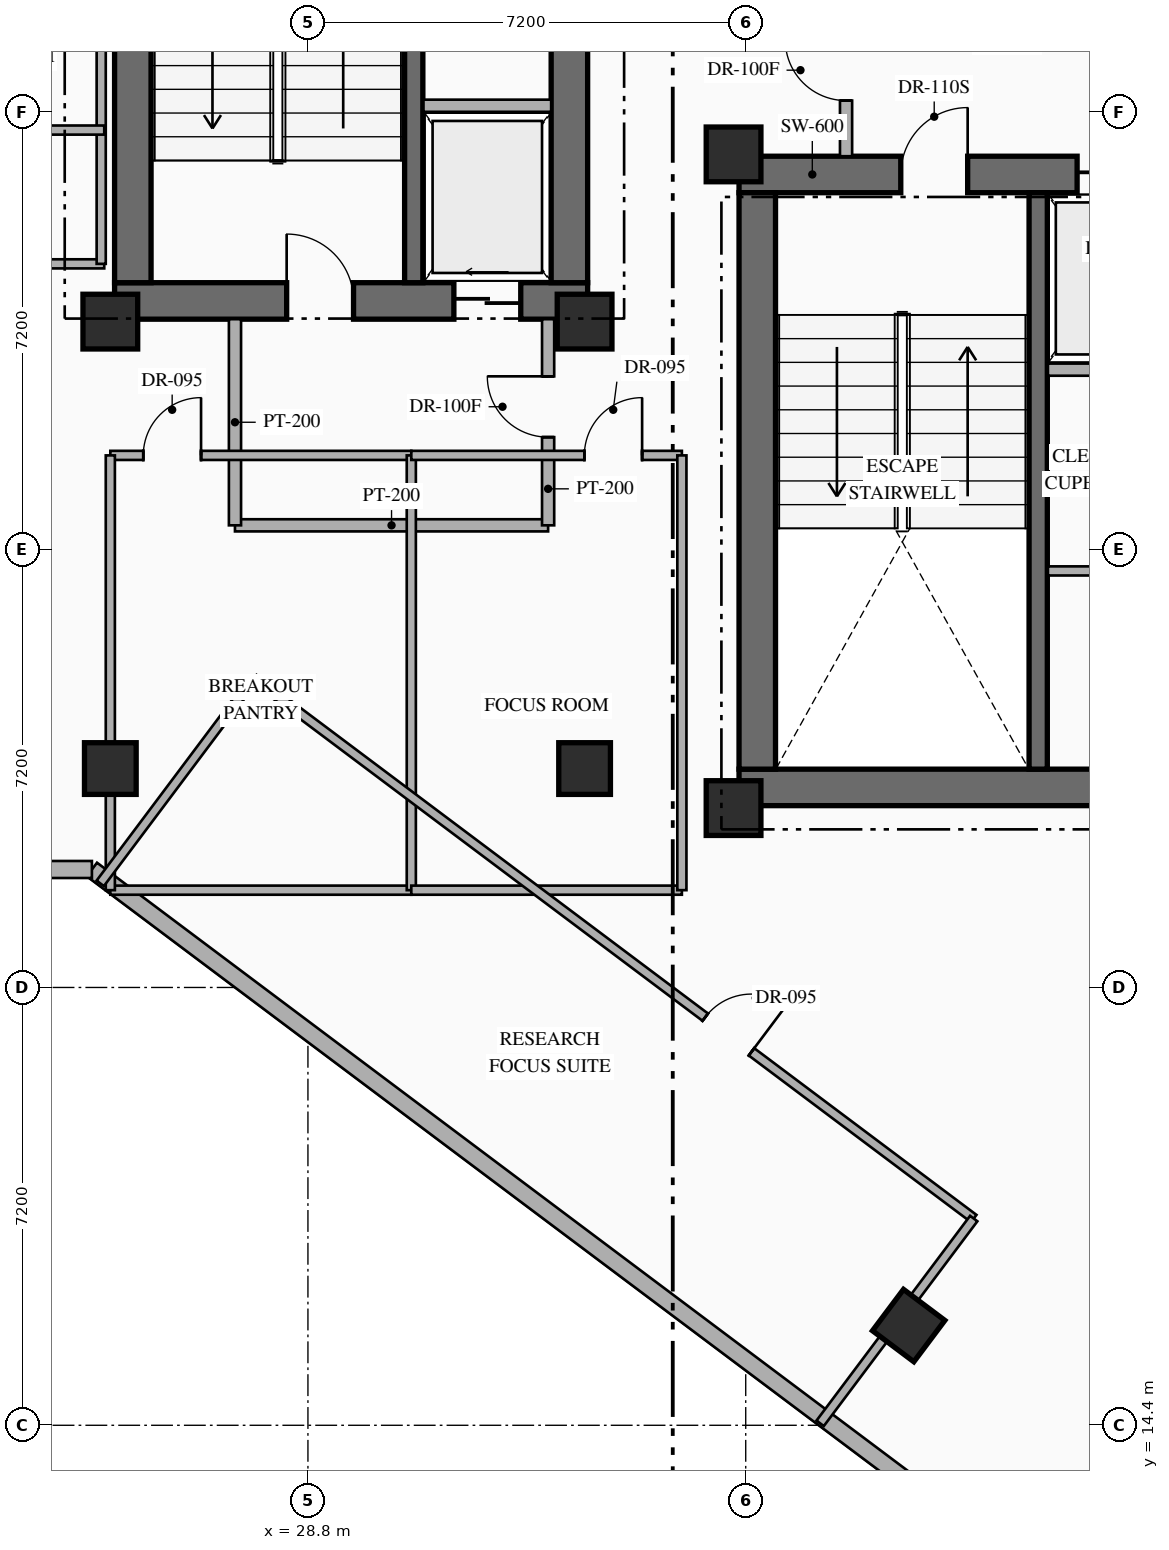
"""IFC4 building model, lengths in metres.
Left out: names, types, materials, properties, quantities, classifications, styles, units other than length and angle.
Written with IfcOpenShell. Run it as: python <this file> out.ifc"""

import sys

from ifc_helpers import new_model, si_unit, direction, frame, frame_2d, origin, origin_2d, place, context, subcontext, project, spatial, rectangle, hollow_rectangle, extrude, element, fill, save


model = new_model("IFC4")
c1 = context("Model", 3, precision=1e-05, world=origin(), true_north=direction((0.0, 1.0)))
c2 = subcontext(c1, "Body", "Model", "MODEL_VIEW")
j1 = project(units=[si_unit("LENGTHUNIT", "METRE"), si_unit("PLANEANGLEUNIT", "RADIAN")], contexts=[c1])
p1 = place(None, origin())
s1 = spatial("IfcSite", under=j1, at=p1, CompositionType="ELEMENT")
p2 = place(p1, origin())
s2 = spatial("IfcBuilding", under=s1, at=p2, CompositionType="ELEMENT")
p3 = place(p2, frame((0.0, 0.0, 156.45)))
s3 = spatial("IfcBuildingStorey", under=s2, at=p3, CompositionType="ELEMENT", Elevation=156.45)
p4 = place(p3, frame((25.62, 32.89, 0.0), z_axis=(0.0, 0.0, 1.0), x_axis=(1.0, 0.0, 0.0)))
e1 = element("IfcWall", 1, at=p4, inside=s3, PredefinedType="SHEAR", context=c2, shape_type="SweptSolid", body=[
    extrude(rectangle(XDim=7.78, YDim=0.6, at=frame_2d((3.89, 0.0))), origin(), (0.0, 0.0, 1.0), 3.6),
])
p5 = place(p4, frame((2.83, 0.0, 0.0)))
e2 = element("IfcOpeningElement", 2, at=p5, cuts=e1, PredefinedType="OPENING", context=c2, shape_type="SweptSolid", body=[
    extrude(rectangle(XDim=1.1, YDim=2.2, at=frame_2d((0.55, 1.1))), frame((0.0, 0.31, 0.0), z_axis=(0.0, -1.0, 0.0), x_axis=(1.0, 0.0, 0.0)), (0.0, 0.0, 1.0), 0.62),
])
p6 = place(p4, frame((5.58, 0.0, 0.0)))
e3 = element("IfcOpeningElement", 3, at=p6, cuts=e1, PredefinedType="OPENING", context=c2, shape_type="SweptSolid", body=[
    extrude(rectangle(XDim=1.1, YDim=2.15, at=frame_2d((0.55, 1.075))), frame((0.0, 0.31, 0.0), z_axis=(0.0, -1.0, 0.0), x_axis=(1.0, 0.0, 0.0)), (0.0, 0.0, 1.0), 0.62),
])
p7 = place(p3, frame((25.92, 33.19, 0.0), z_axis=(0.0, 0.0, 1.0), x_axis=(0.0, 1.0, 0.0)))
e4 = element("IfcWall", 4, at=p7, inside=s3, PredefinedType="SHEAR", context=c2, shape_type="SweptSolid", body=[
    extrude(rectangle(XDim=9.48, YDim=0.6, at=frame_2d((4.74, 0.0))), origin(), (0.0, 0.0, 1.0), 3.6),
])
p8 = place(p3, frame((33.1, 33.19, 0.0), z_axis=(0.0, 0.0, 1.0), x_axis=(0.0, 1.0, 0.0)))
e5 = element("IfcWall", 5, at=p8, inside=s3, PredefinedType="SHEAR", context=c2, shape_type="SweptSolid", body=[
    extrude(rectangle(XDim=9.48, YDim=0.6, at=frame_2d((4.74, 0.0))), origin(), (0.0, 0.0, 1.0), 3.6),
])
p9 = place(p8, frame((4.16, 0.0, 0.0)))
e6 = element("IfcOpeningElement", 6, at=p9, cuts=e5, PredefinedType="OPENING", context=c2, shape_type="SweptSolid", body=[
    extrude(rectangle(XDim=0.85, YDim=2.08, at=frame_2d((0.425, 1.04))), frame((0.0, 0.31, 0.0), z_axis=(0.0, -1.0, 0.0), x_axis=(1.0, 0.0, 0.0)), (0.0, 0.0, 1.0), 0.62),
])
p10 = place(p8, frame((7.36, 0.0, 0.0)))
e7 = element("IfcOpeningElement", 7, at=p10, cuts=e5, PredefinedType="OPENING", context=c2, shape_type="SweptSolid", body=[
    extrude(rectangle(XDim=0.85, YDim=2.08, at=frame_2d((0.425, 1.04))), frame((0.0, 0.31, 0.0), z_axis=(0.0, -1.0, 0.0), x_axis=(1.0, 0.0, 0.0)), (0.0, 0.0, 1.0), 0.62),
])
p11 = place(p3, frame((30.54, 33.19, 0.0), z_axis=(0.0, 0.0, 1.0), x_axis=(0.0, 1.0, 0.0)))
e8 = element("IfcWall", 8, at=p11, inside=s3, PredefinedType="SHEAR", context=c2, shape_type="SweptSolid", body=[
    extrude(rectangle(XDim=9.48, YDim=0.3, at=frame_2d((4.74, 0.0))), origin(), (0.0, 0.0, 1.0), 3.6),
])
p12 = place(p3, frame((35.89, 24.89, 0.0), z_axis=(0.0, 0.0, 1.0), x_axis=(1.0, 0.0, 0.0)))
e9 = element("IfcWall", 9, at=p12, inside=s3, PredefinedType="SHEAR", context=c2, shape_type="SweptSolid", body=[
    extrude(rectangle(XDim=7.76, YDim=0.6, at=frame_2d((3.88, 0.0))), origin(), (0.0, 0.0, 1.0), 3.6),
])
p13 = place(p3, frame((35.89, 34.97, 0.0), z_axis=(0.0, 0.0, 1.0), x_axis=(1.0, 0.0, 0.0)))
e10 = element("IfcWall", 10, at=p13, inside=s3, PredefinedType="SHEAR", context=c2, shape_type="SweptSolid", body=[
    extrude(rectangle(XDim=7.76, YDim=0.6, at=frame_2d((3.88, 0.0))), origin(), (0.0, 0.0, 1.0), 3.6),
])
p14 = place(p13, frame((2.66, 0.0, 0.0)))
e11 = element("IfcOpeningElement", 11, at=p14, cuts=e10, PredefinedType="OPENING", context=c2, shape_type="SweptSolid", body=[
    extrude(rectangle(XDim=1.1, YDim=2.2, at=frame_2d((0.55, 1.1))), frame((0.0, 0.31, 0.0), z_axis=(0.0, -1.0, 0.0), x_axis=(1.0, 0.0, 0.0)), (0.0, 0.0, 1.0), 0.62),
])
p15 = place(p13, frame((5.56, 0.0, 0.0)))
e12 = element("IfcOpeningElement", 12, at=p15, cuts=e10, PredefinedType="OPENING", context=c2, shape_type="SweptSolid", body=[
    extrude(rectangle(XDim=1.12, YDim=2.15, at=frame_2d((0.56, 1.075))), frame((0.0, 0.31, 0.0), z_axis=(0.0, -1.0, 0.0), x_axis=(1.0, 0.0, 0.0)), (0.0, 0.0, 1.0), 0.62),
])
p16 = place(p3, frame((36.19, 25.19, 0.0), z_axis=(0.0, 0.0, 1.0), x_axis=(0.0, 1.0, 0.0)))
e13 = element("IfcWall", 13, at=p16, inside=s3, PredefinedType="SHEAR", context=c2, shape_type="SweptSolid", body=[
    extrude(rectangle(XDim=9.48, YDim=0.6, at=frame_2d((4.74, 0.0))), origin(), (0.0, 0.0, 1.0), 3.6),
])
p17 = place(p3, frame((40.81, 25.19, 0.0), z_axis=(0.0, 0.0, 1.0), x_axis=(0.0, 1.0, 0.0)))
e14 = element("IfcWall", 14, at=p17, inside=s3, PredefinedType="SHEAR", context=c2, shape_type="SweptSolid", body=[
    extrude(rectangle(XDim=9.48, YDim=0.3, at=frame_2d((4.74, 0.0))), origin(), (0.0, 0.0, 1.0), 3.6),
])
for number, where, z_axis, x_axis in (
    (15, (25.55, 32.55, 0.0), (0.0, 0.0, 1.0), (1.0, 0.0, 0.0)),
    (16, (33.35, 32.55, 0.0), (0.0, 0.0, 1.0), (1.0, 0.0, 0.0)),
    (17, (35.8, 24.55, 0.0), (0.0, 0.0, 1.0), (1.0, 0.0, 0.0)),
    (18, (35.8, 35.3, 0.0), (0.0, 0.0, 1.0), (1.0, 0.0, 0.0)),
):
    element("IfcColumn", number, at=place(p3, frame(where, z_axis=z_axis, x_axis=x_axis)), inside=s3, PredefinedType="COLUMN", context=c2, shape_type="SweptSolid", body=[
        extrude(rectangle(XDim=0.9, YDim=0.9, at=origin_2d()), origin(), (0.0, 0.0, 1.0), 3.6),
    ])
for number, where, z_axis, x_axis in (
    (19, (25.55, 25.2, 0.0), (0.0, 0.0, 1.0), (1.0, 0.0, 0.0)),
    (20, (33.35, 25.2, 0.0), (0.0, 0.0, 1.0), (1.0, 0.0, 0.0)),
    (21, (38.68, 16.04, 0.0), (0.0, 0.0, 1.0), (0.8, -0.6, 0.0)),
):
    element("IfcColumn", number, at=place(p3, frame(where, z_axis=z_axis, x_axis=x_axis)), inside=s3, PredefinedType="COLUMN", context=c2, shape_type="SweptSolid", body=[
        extrude(hollow_rectangle(XDim=0.85, YDim=0.85, WallThickness=0.032, at=origin_2d()), origin(), (0.0, 0.0, 1.0), 3.6),
    ])
p18 = place(p3, frame((44.918, 8.787, 0.0), z_axis=(0.0, 0.0, 1.0), x_axis=(-0.800004765927, 0.599993645378, 0.0)))
e22 = element("IfcWall", 22, at=p18, inside=s3, PredefinedType="STANDARD", context=c2, shape_type="SweptSolid", body=[
    extrude(rectangle(XDim=24.588, YDim=0.28, at=frame_2d((12.294, 0.0))), origin(), (0.0, 0.0, 1.0), 3.35),
])
p19 = place(p3, frame((25.247, 23.54, 0.0), z_axis=(0.0, 0.0, 1.0), x_axis=(-1.0, 0.0, 0.0)))
e23 = element("IfcWall", 23, at=p19, inside=s3, PredefinedType="STANDARD", context=c2, shape_type="SweptSolid", body=[
    extrude(rectangle(XDim=6.747, YDim=0.28, at=frame_2d((3.374, 0.0))), origin(), (0.0, 0.0, 1.0), 3.35),
])
p20 = place(p3, frame((30.7, 36.1, 0.0), z_axis=(0.0, 0.0, 1.0), x_axis=(1.0, 0.0, 0.0)))
e24 = element("IfcWall", 24, at=p20, inside=s3, PredefinedType="STANDARD", context=c2, shape_type="SweptSolid", body=[
    extrude(rectangle(XDim=2.1, YDim=0.2, at=frame_2d((1.05, 0.0))), origin(), (0.0, 0.0, 1.0), 3.35),
])
p21 = place(p3, frame((40.97, 31.76, 0.0), z_axis=(0.0, 0.0, 1.0), x_axis=(1.0, 0.0, 0.0)))
e25 = element("IfcWall", 25, at=p21, inside=s3, PredefinedType="STANDARD", context=c2, shape_type="SweptSolid", body=[
    extrude(rectangle(XDim=2.08, YDim=0.2, at=frame_2d((1.04, 0.0))), origin(), (0.0, 0.0, 1.0), 3.35),
])
p22 = place(p3, frame((40.97, 28.45, 0.0), z_axis=(0.0, 0.0, 1.0), x_axis=(1.0, 0.0, 0.0)))
e26 = element("IfcWall", 26, at=p22, inside=s3, PredefinedType="PARTITIONING", context=c2, shape_type="SweptSolid", body=[
    extrude(rectangle(XDim=2.08, YDim=0.15, at=frame_2d((1.04, 0.0))), origin(), (0.0, 0.0, 1.0), 3.35),
])
p23 = place(p3, frame((27.6, 29.2, 0.0), z_axis=(0.0, 0.0, 1.0), x_axis=(1.0, 0.0, 0.0)))
e27 = element("IfcWall", 27, at=p23, inside=s3, PredefinedType="STANDARD", context=c2, shape_type="SweptSolid", body=[
    extrude(rectangle(XDim=5.15, YDim=0.2, at=frame_2d((2.575, 0.0))), origin(), (0.0, 0.0, 1.0), 3.35),
])
p24 = place(p3, frame((27.6, 29.2, 0.0), z_axis=(0.0, 0.0, 1.0), x_axis=(0.0, 1.0, 0.0)))
e28 = element("IfcWall", 28, at=p24, inside=s3, PredefinedType="STANDARD", context=c2, shape_type="SweptSolid", body=[
    extrude(rectangle(XDim=3.39, YDim=0.2, at=frame_2d((1.695, 0.0))), origin(), (0.0, 0.0, 1.0), 3.35),
])
p25 = place(p3, frame((32.75, 29.2, 0.0), z_axis=(0.0, 0.0, 1.0), x_axis=(0.0, 1.0, 0.0)))
e29 = element("IfcWall", 29, at=p25, inside=s3, PredefinedType="STANDARD", context=c2, shape_type="SweptSolid", body=[
    extrude(rectangle(XDim=3.39, YDim=0.2, at=frame_2d((1.695, 0.0))), origin(), (0.0, 0.0, 1.0), 3.35),
])
p26 = place(p25, frame((1.45, 0.0, 0.0)))
e30 = element("IfcOpeningElement", 30, at=p26, cuts=e29, PredefinedType="OPENING", context=c2, shape_type="SweptSolid", body=[
    extrude(rectangle(XDim=1.0, YDim=2.2, at=frame_2d((0.5, 1.1))), frame((0.0, 0.11, 0.0), z_axis=(0.0, -1.0, 0.0), x_axis=(1.0, 0.0, 0.0)), (0.0, 0.0, 1.0), 0.22),
])
p27 = place(p3, frame((37.65, 35.27, 0.0), z_axis=(0.0, 0.0, 1.0), x_axis=(0.0, 1.0, 0.0)))
e31 = element("IfcWall", 31, at=p27, inside=s3, PredefinedType="STANDARD", context=c2, shape_type="SweptSolid", body=[
    extrude(rectangle(XDim=2.83, YDim=0.2, at=frame_2d((1.415, 0.0))), origin(), (0.0, 0.0, 1.0), 3.35),
])
p28 = place(p27, frame((0.915, 0.0, 0.0)))
e32 = element("IfcOpeningElement", 32, at=p28, cuts=e31, PredefinedType="OPENING", context=c2, shape_type="SweptSolid", body=[
    extrude(rectangle(XDim=1.0, YDim=2.2, at=frame_2d((0.5, 1.1))), frame((0.0, 0.11, 0.0), z_axis=(0.0, -1.0, 0.0), x_axis=(1.0, 0.0, 0.0)), (0.0, 0.0, 1.0), 0.22),
])
p29 = place(p3, frame((22.15, 33.5, 0.0), z_axis=(0.0, 0.0, 1.0), x_axis=(1.0, 0.0, 0.0)))
e33 = element("IfcWall", 33, at=p29, inside=s3, PredefinedType="PARTITIONING", context=c2, shape_type="SweptSolid", body=[
    extrude(rectangle(XDim=3.3, YDim=0.15, at=frame_2d((1.65, 0.0))), origin(), (0.0, 0.0, 1.0), 3.35),
])
p30 = place(p3, frame((25.4, 33.5, 0.0), z_axis=(0.0, 0.0, 1.0), x_axis=(0.0, 1.0, 0.0)))
e34 = element("IfcWall", 34, at=p30, inside=s3, PredefinedType="PARTITIONING", context=c2, shape_type="SweptSolid", body=[
    extrude(rectangle(XDim=6.6, YDim=0.15, at=frame_2d((3.3, 0.0))), origin(), (0.0, 0.0, 1.0), 3.35),
])
p31 = place(p3, frame((22.15, 35.7, 0.0), z_axis=(0.0, 0.0, 1.0), x_axis=(1.0, 0.0, 0.0)))
e35 = element("IfcWall", 35, at=p31, inside=s3, PredefinedType="PARTITIONING", context=c2, shape_type="SweptSolid", body=[
    extrude(rectangle(XDim=3.3, YDim=0.15, at=frame_2d((1.65, 0.0))), origin(), (0.0, 0.0, 1.0), 3.35),
])
p32 = place(p3, frame((25.55, 23.2, 0.0), z_axis=(0.0, 0.0, 1.0), x_axis=(1.0, 0.0, 0.0)))
e36 = element("IfcWall", 36, at=p32, inside=s3, PredefinedType="PARTITIONING", context=c2, shape_type="SweptSolid", body=[
    extrude(rectangle(XDim=4.95, YDim=0.15, at=frame_2d((2.475, 0.0))), origin(), (0.0, 0.0, 1.0), 3.35),
])
p33 = place(p3, frame((25.55, 30.35, 0.0), z_axis=(0.0, 0.0, 1.0), x_axis=(1.0, 0.0, 0.0)))
e37 = element("IfcWall", 37, at=p33, inside=s3, PredefinedType="PARTITIONING", context=c2, shape_type="SweptSolid", body=[
    extrude(rectangle(XDim=4.95, YDim=0.15, at=frame_2d((2.475, 0.0))), origin(), (0.0, 0.0, 1.0), 3.35),
])
p34 = place(p33, frame((0.542, 0.0, 0.0)))
e38 = element("IfcOpeningElement", 38, at=p34, cuts=e37, PredefinedType="OPENING", context=c2, shape_type="SweptSolid", body=[
    extrude(rectangle(XDim=0.95, YDim=2.15, at=frame_2d((0.475, 1.075))), frame((0.0, 0.085, 0.0), z_axis=(0.0, -1.0, 0.0), x_axis=(1.0, 0.0, 0.0)), (0.0, 0.0, 1.0), 0.17),
])
p35 = place(p3, frame((25.55, 23.2, 0.0), z_axis=(0.0, 0.0, 1.0), x_axis=(0.0, 1.0, 0.0)))
e39 = element("IfcWall", 39, at=p35, inside=s3, PredefinedType="PARTITIONING", context=c2, shape_type="SweptSolid", body=[
    extrude(rectangle(XDim=7.15, YDim=0.15, at=frame_2d((3.575, 0.0))), origin(), (0.0, 0.0, 1.0), 2.695),
])
p36 = place(p3, frame((30.5, 23.2, 0.0), z_axis=(0.0, 0.0, 1.0), x_axis=(0.0, 1.0, 0.0)))
e40 = element("IfcWall", 40, at=p36, inside=s3, PredefinedType="PARTITIONING", context=c2, shape_type="SweptSolid", body=[
    extrude(rectangle(XDim=7.15, YDim=0.15, at=frame_2d((3.575, 0.0))), origin(), (0.0, 0.0, 1.0), 3.35),
])
p37 = place(p3, frame((30.5, 23.2, 0.0), z_axis=(0.0, 0.0, 1.0), x_axis=(1.0, 0.0, 0.0)))
e41 = element("IfcWall", 41, at=p37, inside=s3, PredefinedType="PARTITIONING", context=c2, shape_type="SweptSolid", body=[
    extrude(rectangle(XDim=4.45, YDim=0.15, at=frame_2d((2.225, 0.0))), origin(), (0.0, 0.0, 1.0), 3.35),
])
p38 = place(p3, frame((30.5, 30.35, 0.0), z_axis=(0.0, 0.0, 1.0), x_axis=(1.0, 0.0, 0.0)))
e42 = element("IfcWall", 42, at=p38, inside=s3, PredefinedType="PARTITIONING", context=c2, shape_type="SweptSolid", body=[
    extrude(rectangle(XDim=4.45, YDim=0.15, at=frame_2d((2.225, 0.0))), origin(), (0.0, 0.0, 1.0), 3.35),
])
p39 = place(p38, frame((2.846, 0.0, 0.0)))
e43 = element("IfcOpeningElement", 43, at=p39, cuts=e42, PredefinedType="OPENING", context=c2, shape_type="SweptSolid", body=[
    extrude(rectangle(XDim=0.95, YDim=2.15, at=frame_2d((0.475, 1.075))), frame((0.0, 0.085, 0.0), z_axis=(0.0, -1.0, 0.0), x_axis=(1.0, 0.0, 0.0)), (0.0, 0.0, 1.0), 0.17),
])
p40 = place(p3, frame((34.95, 23.2, 0.0), z_axis=(0.0, 0.0, 1.0), x_axis=(0.0, 1.0, 0.0)))
e44 = element("IfcWall", 44, at=p40, inside=s3, PredefinedType="PARTITIONING", context=c2, shape_type="SweptSolid", body=[
    extrude(rectangle(XDim=7.15, YDim=0.15, at=frame_2d((3.575, 0.0))), origin(), (0.0, 0.0, 1.0), 3.35),
])
p41 = place(p3, frame((27.91, 26.68, 0.0), z_axis=(0.0, 0.0, 1.0), x_axis=(0.800005938517, -0.599992081896, 0.0)))
e45 = element("IfcWall", 45, at=p41, inside=s3, PredefinedType="PARTITIONING", context=c2, shape_type="SweptSolid", body=[
    extrude(rectangle(XDim=14.8, YDim=0.15, at=frame_2d((7.4, 0.0))), origin(), (0.0, 0.0, 1.0), 3.35),
])
p42 = place(p41, frame((9.281, 0.0, 0.0)))
e46 = element("IfcOpeningElement", 46, at=p42, cuts=e45, PredefinedType="OPENING", context=c2, shape_type="SweptSolid", body=[
    extrude(rectangle(XDim=0.95, YDim=2.15, at=frame_2d((0.475, 1.075))), frame((0.0, 0.085, 0.0), z_axis=(0.0, -1.0, 0.0), x_axis=(1.0, 0.0, 0.0)), (0.0, 0.0, 1.0), 0.17),
])
p43 = place(p3, frame((25.384, 23.312, 0.0), z_axis=(0.0, 0.0, 1.0), x_axis=(0.599990721155, 0.80000695905, 0.0)))
e47 = element("IfcWall", 47, at=p43, inside=s3, PredefinedType="PARTITIONING", context=c2, shape_type="SweptSolid", body=[
    extrude(rectangle(XDim=4.21, YDim=0.15, at=frame_2d((2.105, 0.0))), origin(), (0.0, 0.0, 1.0), 3.35),
])
p44 = place(p3, frame((37.224, 14.432, 0.0), z_axis=(0.0, 0.0, 1.0), x_axis=(0.599962885857, 0.800027834262, 0.0)))
e48 = element("IfcWall", 48, at=p44, inside=s3, PredefinedType="PARTITIONING", context=c2, shape_type="SweptSolid", body=[
    extrude(rectangle(XDim=4.21, YDim=0.15, at=frame_2d((2.105, 0.0))), origin(), (0.0, 0.0, 1.0), 2.695),
])
p45 = place(p5, origin())
e49 = element("IfcDoor", 49, at=p45, inside=s3, OperationType="SINGLE_SWING_LEFT", PredefinedType="DOOR", context=c2, shape_type="SweptSolid", body=[
    extrude(rectangle(XDim=1.1, YDim=2.2, at=frame_2d((0.55, 1.1))), frame((0.0, 0.025, 0.0), z_axis=(0.0, -1.0, 0.0), x_axis=(1.0, 0.0, 0.0)), (0.0, 0.0, 1.0), 0.05),
])
fill(e2, e49)
p46 = place(p6, origin())
e50 = element("IfcDoor", 50, at=p46, inside=s3, OperationType="SLIDING_TO_LEFT", PredefinedType="USERDEFINED", context=c2, shape_type="SweptSolid", body=[
    extrude(rectangle(XDim=1.1, YDim=2.15, at=frame_2d((0.55, 1.075))), frame((0.0, 0.025, 0.0), z_axis=(0.0, -1.0, 0.0), x_axis=(1.0, 0.0, 0.0)), (0.0, 0.0, 1.0), 0.05),
])
fill(e3, e50)
p47 = place(p14, origin())
e51 = element("IfcDoor", 51, at=p47, inside=s3, OperationType="SINGLE_SWING_RIGHT", PredefinedType="DOOR", context=c2, shape_type="SweptSolid", body=[
    extrude(rectangle(XDim=1.1, YDim=2.2, at=frame_2d((0.55, 1.1))), frame((0.0, 0.025, 0.0), z_axis=(0.0, -1.0, 0.0), x_axis=(1.0, 0.0, 0.0)), (0.0, 0.0, 1.0), 0.05),
])
fill(e11, e51)
p48 = place(p15, origin())
e52 = element("IfcDoor", 52, at=p48, inside=s3, OperationType="SLIDING_TO_RIGHT", PredefinedType="USERDEFINED", context=c2, shape_type="SweptSolid", body=[
    extrude(rectangle(XDim=1.12, YDim=2.15, at=frame_2d((0.56, 1.075))), frame((0.0, 0.025, 0.0), z_axis=(0.0, -1.0, 0.0), x_axis=(1.0, 0.0, 0.0)), (0.0, 0.0, 1.0), 0.05),
])
fill(e12, e52)
p49 = place(p26, origin())
e53 = element("IfcDoor", 53, at=p49, inside=s3, OperationType="SINGLE_SWING_RIGHT", PredefinedType="DOOR", context=c2, shape_type="SweptSolid", body=[
    extrude(rectangle(XDim=1.0, YDim=2.2, at=frame_2d((0.5, 1.1))), frame((0.0, 0.025, 0.0), z_axis=(0.0, -1.0, 0.0), x_axis=(1.0, 0.0, 0.0)), (0.0, 0.0, 1.0), 0.05),
])
fill(e30, e53)
p50 = place(p28, origin())
e54 = element("IfcDoor", 54, at=p50, inside=s3, OperationType="SINGLE_SWING_RIGHT", PredefinedType="DOOR", context=c2, shape_type="SweptSolid", body=[
    extrude(rectangle(XDim=1.0, YDim=2.2, at=frame_2d((0.5, 1.1))), frame((0.0, 0.025, 0.0), z_axis=(0.0, -1.0, 0.0), x_axis=(1.0, 0.0, 0.0)), (0.0, 0.0, 1.0), 0.05),
])
fill(e32, e54)
p51 = place(p34, origin())
e55 = element("IfcDoor", 55, at=p51, inside=s3, OperationType="SINGLE_SWING_RIGHT", PredefinedType="DOOR", context=c2, shape_type="SweptSolid", body=[
    extrude(rectangle(XDim=0.95, YDim=2.15, at=frame_2d((0.475, 1.075))), frame((0.0, 0.025, 0.0), z_axis=(0.0, -1.0, 0.0), x_axis=(1.0, 0.0, 0.0)), (0.0, 0.0, 1.0), 0.05),
])
fill(e38, e55)
p52 = place(p39, origin())
e56 = element("IfcDoor", 56, at=p52, inside=s3, OperationType="SINGLE_SWING_RIGHT", PredefinedType="DOOR", context=c2, shape_type="SweptSolid", body=[
    extrude(rectangle(XDim=0.95, YDim=2.15, at=frame_2d((0.475, 1.075))), frame((0.0, 0.025, 0.0), z_axis=(0.0, -1.0, 0.0), x_axis=(1.0, 0.0, 0.0)), (0.0, 0.0, 1.0), 0.05),
])
fill(e43, e56)
p53 = place(p42, origin())
e57 = element("IfcDoor", 57, at=p53, inside=s3, OperationType="SINGLE_SWING_RIGHT", PredefinedType="DOOR", context=c2, shape_type="SweptSolid", body=[
    extrude(rectangle(XDim=0.95, YDim=2.15, at=frame_2d((0.475, 1.075))), frame((0.0, 0.025, 0.0), z_axis=(0.0, -1.0, 0.0), x_axis=(1.0, 0.0, 0.0)), (0.0, 0.0, 1.0), 0.05),
])
fill(e46, e57)
save(model, sys.argv[1])
